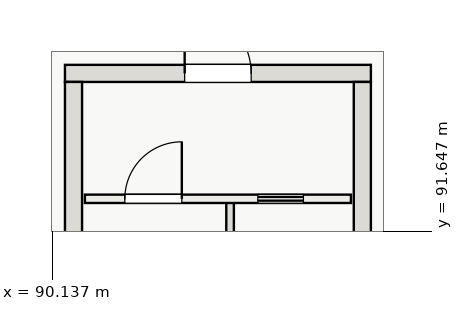
"""IFC4 building model, lengths in metres.
Left out: names, types, materials, properties, quantities, classifications, styles, units other than length and angle.
Written with IfcOpenShell. Run it as: python <this file> out.ifc"""

import sys

from ifc_helpers import new_model, si_unit, direction, frame, frame_2d, origin, place, context, subcontext, project, spatial, rectangle, extrude, element, fill, save


model = new_model("IFC4")
c1 = context("Model", 3, precision=1e-05, world=origin(), true_north=direction((0.0, 1.0)))
c2 = subcontext(c1, "Body", "Model", "MODEL_VIEW")
j1 = project(units=[si_unit("LENGTHUNIT", "METRE"), si_unit("PLANEANGLEUNIT", "RADIAN")], contexts=[c1])
p1 = place(None, origin())
s1 = spatial("IfcSite", under=j1, at=p1, CompositionType="ELEMENT")
p2 = place(p1, origin())
s2 = spatial("IfcBuilding", under=s1, at=p2, CompositionType="ELEMENT")
p3 = place(p2, frame((0.0, 0.0, -4.8)))
s3 = spatial("IfcBuildingStorey", under=s2, at=p3, CompositionType="ELEMENT", Elevation=-4.8)
p4 = place(p3, frame((90.475, 95.8, -0.45), z_axis=(0.0, 0.0, 1.0), x_axis=(1.0, 0.0, 0.0)))
e1 = element("IfcWall", 1, at=p4, inside=s3, PredefinedType="SHEAR", context=c2, shape_type="SweptSolid", body=[
    extrude(rectangle(XDim=8.05, YDim=0.45, at=frame_2d((4.025, 0.0))), origin(), (0.0, 0.0, 1.0), 5.25),
])
p5 = place(p4, frame((3.15, 0.0, 0.45)))
e2 = element("IfcOpeningElement", 2, at=p5, cuts=e1, PredefinedType="OPENING", context=c2, shape_type="SweptSolid", body=[
    extrude(rectangle(XDim=1.75, YDim=2.3, at=frame_2d((0.875, 1.15))), frame((0.0, 0.235, 0.0), z_axis=(0.0, -1.0, 0.0), x_axis=(1.0, 0.0, 0.0)), (0.0, 0.0, 1.0), 0.47),
])
for number, where, z_axis, x_axis in (
    (3, (90.7, 84.425, -0.45), (0.0, 0.0, 1.0), (0.0, 1.0, 0.0)),
    (4, (98.3, 84.425, -0.45), (0.0, 0.0, 1.0), (0.0, 1.0, 0.0)),
):
    element("IfcWall", number, at=place(p3, frame(where, z_axis=z_axis, x_axis=x_axis)), inside=s3, PredefinedType="SHEAR", context=c2, shape_type="SweptSolid", body=[
        extrude(rectangle(XDim=11.15, YDim=0.45, at=frame_2d((5.575, 0.0))), origin(), (0.0, 0.0, 1.0), 5.25),
    ])
p6 = place(p3, frame((94.82, 84.45, -0.45), z_axis=(0.0, 0.0, 1.0), x_axis=(0.0, 1.0, 0.0)))
e5 = element("IfcWall", 5, at=p6, inside=s3, PredefinedType="SOLIDWALL", context=c2, shape_type="SweptSolid", body=[
    extrude(rectangle(XDim=8.0, YDim=0.2, at=frame_2d((4.0, 0.0))), origin(), (0.0, 0.0, 1.0), 5.25),
])
p7 = place(p3, frame((91.0, 92.5, 0.0), z_axis=(0.0, 0.0, 1.0), x_axis=(1.0, 0.0, 0.0)))
e6 = element("IfcWall", 6, at=p7, inside=s3, PredefinedType="SOLIDWALL", context=c2, shape_type="SweptSolid", body=[
    extrude(rectangle(XDim=7.0, YDim=0.22, at=frame_2d((3.5, 0.0))), origin(), (0.0, 0.0, 1.0), 4.4),
])
p8 = place(p7, frame((1.05, 0.0, 0.0)))
e7 = element("IfcOpeningElement", 7, at=p8, cuts=e6, PredefinedType="OPENING", context=c2, shape_type="SweptSolid", body=[
    extrude(rectangle(XDim=1.5, YDim=2.2, at=frame_2d((0.75, 1.1))), frame((0.0, 0.12, 0.0), z_axis=(0.0, -1.0, 0.0), x_axis=(1.0, 0.0, 0.0)), (0.0, 0.0, 1.0), 0.24),
])
p9 = place(p7, frame((4.55, 0.0, 0.0)))
e8 = element("IfcOpeningElement", 8, at=p9, cuts=e6, PredefinedType="OPENING", context=c2, shape_type="SweptSolid", body=[
    extrude(rectangle(XDim=1.2, YDim=2.2, at=frame_2d((0.6, 1.1))), frame((0.0, 0.12, 0.0), z_axis=(0.0, -1.0, 0.0), x_axis=(1.0, 0.0, 0.0)), (0.0, 0.0, 1.0), 0.24),
])
p10 = place(p8, origin())
e9 = element("IfcDoor", 9, at=p10, inside=s3, OperationType="SINGLE_SWING_RIGHT", PredefinedType="DOOR", context=c2, shape_type="SweptSolid", body=[
    extrude(rectangle(XDim=1.5, YDim=2.2, at=frame_2d((0.75, 1.1))), frame((0.0, 0.025, 0.0), z_axis=(0.0, -1.0, 0.0), x_axis=(1.0, 0.0, 0.0)), (0.0, 0.0, 1.0), 0.05),
])
fill(e7, e9)
p11 = place(p9, origin())
e10 = element("IfcDoor", 10, at=p11, inside=s3, OperationType="SLIDING_TO_RIGHT", PredefinedType="DOOR", context=c2, shape_type="SweptSolid", body=[
    extrude(rectangle(XDim=1.2, YDim=2.2, at=frame_2d((0.6, 1.1))), frame((0.0, 0.025, 0.0), z_axis=(0.0, -1.0, 0.0), x_axis=(1.0, 0.0, 0.0)), (0.0, 0.0, 1.0), 0.05),
])
fill(e8, e10)
p12 = place(p5, origin())
e11 = element("IfcDoor", 11, at=p12, inside=s3, OperationType="DOUBLE_DOOR_SINGLE_SWING", PredefinedType="DOOR", context=c2, shape_type="SweptSolid", body=[
    extrude(rectangle(XDim=1.75, YDim=2.3, at=frame_2d((0.875, 1.15))), frame((0.0, 0.025, 0.0), z_axis=(0.0, -1.0, 0.0), x_axis=(1.0, 0.0, 0.0)), (0.0, 0.0, 1.0), 0.05),
])
fill(e2, e11)
save(model, sys.argv[1])
